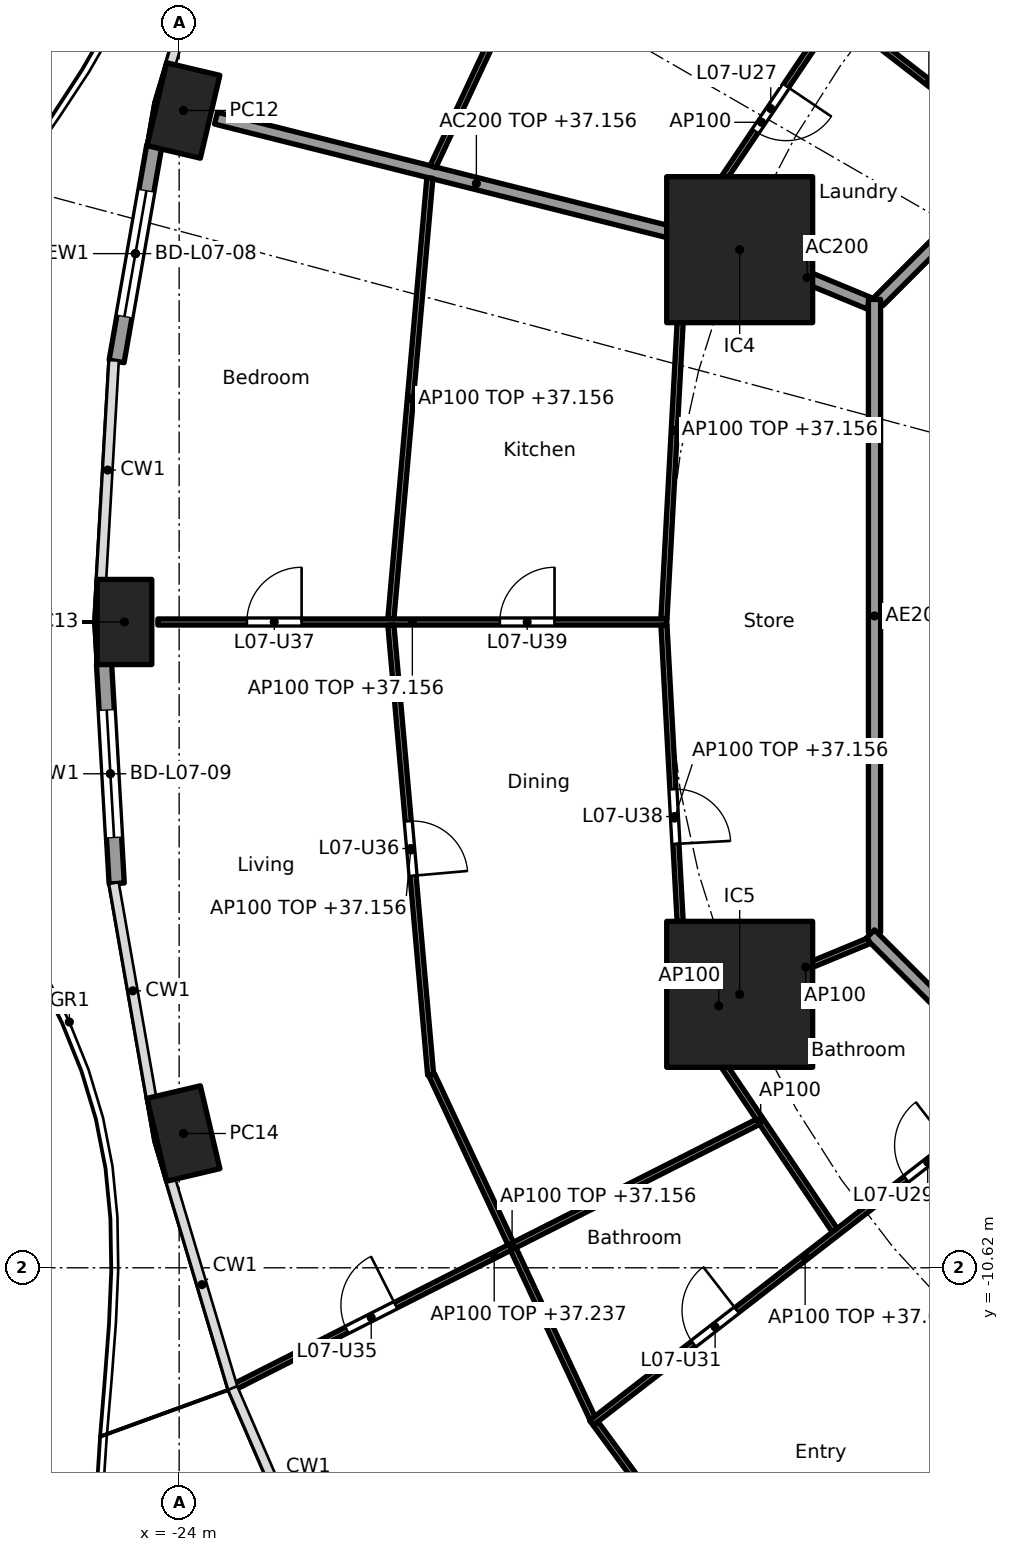
"""IFC4 building model, lengths in metres.
Left out: names, types, materials, properties, quantities, classifications, styles, units other than length and angle.
Written with IfcOpenShell. Run it as: python <this file> out.ifc"""

import sys

from ifc_helpers import new_model, si_unit, direction, frame, frame_2d, origin, origin_2d, place, context, subcontext, project, spatial, rectangle, hollow_rectangle, extrude, element, fill, save


model = new_model("IFC4")
c1 = context("Model", 3, precision=1e-05, world=origin(), true_north=direction((0.0, 1.0)))
c2 = subcontext(c1, "Body", "Model", "MODEL_VIEW")
j1 = project(units=[si_unit("LENGTHUNIT", "METRE"), si_unit("PLANEANGLEUNIT", "RADIAN")], contexts=[c1])
p1 = place(None, origin())
s1 = spatial("IfcSite", under=j1, at=p1, CompositionType="ELEMENT")
p2 = place(p1, origin())
s2 = spatial("IfcBuilding", under=s1, at=p2, CompositionType="ELEMENT")
p3 = place(p2, frame((0.0, 0.0, 34.4)))
s3 = spatial("IfcBuildingStorey", under=s2, at=p3, CompositionType="ELEMENT", Elevation=34.4)
for number, where, z_axis, x_axis in (
    (1, (-23.929, 8.412, 0.0), (0.0, 0.0, 1.0), (-0.229, -0.973, 0.0)),
    (2, (-24.9, 0.0, 0.0), (0.0, 0.0, 1.0), (0.0, -1.0, 0.0)),
    (3, (-23.929, -8.412, 0.0), (0.0, 0.0, 1.0), (0.229, -0.973, 0.0)),
):
    element("IfcColumn", number, at=place(p3, frame(where, z_axis=z_axis, x_axis=x_axis)), inside=s3, PredefinedType="COLUMN", context=c2, shape_type="SweptSolid", body=[
        extrude(hollow_rectangle(XDim=1.4, YDim=0.9, WallThickness=0.05, at=origin_2d()), origin(), (0.0, 0.0, 1.0), 3.7),
    ])
for number, where, z_axis, x_axis in (
    (4, (-14.782, 6.123, 0.0), (0.0, 0.0, 1.0), (1.0, 0.0, 0.0)),
    (5, (-14.782, -6.123, 0.0), (0.0, 0.0, 1.0), (1.0, 0.0, 0.0)),
):
    element("IfcColumn", number, at=place(p3, frame(where, z_axis=z_axis, x_axis=x_axis)), inside=s3, PredefinedType="COLUMN", context=c2, shape_type="SweptSolid", body=[
        extrude(rectangle(XDim=2.4, YDim=2.4, at=origin_2d()), origin(), (0.0, 0.0, 1.0), 3.7),
    ])
p4 = place(p3, frame((-25.029, 4.286, 0.0), z_axis=(0.0, 0.0, 1.0), x_axis=(0.172217377323, 0.98505897029, 0.0)))
e6 = element("IfcWall", 6, at=p4, inside=s3, PredefinedType="SOLIDWALL", context=c2, shape_type="SweptSolid", body=[
    extrude(rectangle(XDim=3.598, YDim=0.25, at=frame_2d((1.799, 0.0))), origin(), (0.0, 0.0, 1.0), 3.44),
])
p5 = place(p4, frame((0.749, 0.0, 0.0)))
e7 = element("IfcOpeningElement", 7, at=p5, cuts=e6, PredefinedType="OPENING", context=c2, shape_type="SweptSolid", body=[
    extrude(rectangle(XDim=2.1, YDim=2.4, at=frame_2d((1.05, 1.2))), frame((0.0, 0.135, 0.0), z_axis=(0.0, -1.0, 0.0), x_axis=(1.0, 0.0, 0.0)), (0.0, 0.0, 1.0), 0.27),
])
p6 = place(p3, frame((-25.027, -4.3, 0.0), z_axis=(0.0, 0.0, 1.0), x_axis=(-0.057478727308, 0.998346731305, 0.0)))
e8 = element("IfcWall", 8, at=p6, inside=s3, PredefinedType="SOLIDWALL", context=c2, shape_type="SweptSolid", body=[
    extrude(rectangle(XDim=3.615, YDim=0.25, at=frame_2d((1.807, 0.0))), origin(), (0.0, 0.0, 1.0), 3.44),
])
p7 = place(p6, frame((0.757, 0.0, 0.0)))
e9 = element("IfcOpeningElement", 9, at=p7, cuts=e8, PredefinedType="OPENING", context=c2, shape_type="SweptSolid", body=[
    extrude(rectangle(XDim=2.1, YDim=2.4, at=frame_2d((1.05, 1.2))), frame((0.0, 0.135, 0.0), z_axis=(0.0, -1.0, 0.0), x_axis=(1.0, 0.0, 0.0)), (0.0, 0.0, 1.0), 0.27),
])
p8 = place(p3, frame((-12.657, 5.243, 0.0), z_axis=(0.0, 0.0, 1.0), x_axis=(-0.923885664896, 0.382668627144, 0.0)))
e10 = element("IfcWall", 10, at=p8, inside=s3, PredefinedType="PARTITIONING", context=c2, shape_type="SweptSolid", body=[
    extrude(rectangle(XDim=2.2, YDim=0.2, at=frame_2d((1.1, 0.0))), origin(), (0.0, 0.0, 1.0), 3.44),
])
p9 = place(p3, frame((-14.831, 6.135, 0.0), z_axis=(0.0, 0.0, 1.0), x_axis=(-0.969884949569, 0.243563512454, 0.0)))
e11 = element("IfcWall", 11, at=p9, inside=s3, PredefinedType="PARTITIONING", context=c2, shape_type="SweptSolid", body=[
    extrude(rectangle(XDim=8.829, YDim=0.2, at=frame_2d((4.415, 0.0))), origin(), (0.0, 0.0, 1.0), 2.756),
])
p10 = place(p3, frame((-5.275, 12.494, 0.0), z_axis=(0.0, 0.0, 1.0), x_axis=(-0.707106781187, -0.707106781187, 0.0)))
e12 = element("IfcWall", 12, at=p10, inside=s3, PredefinedType="PARTITIONING", context=c2, shape_type="SweptSolid", body=[
    extrude(rectangle(XDim=10.209, YDim=0.2, at=frame_2d((5.104, 0.0))), origin(), (0.0, 0.0, 1.0), 3.44),
])
p11 = place(p3, frame((-12.565, 5.304, 0.0), z_axis=(0.0, 0.0, 1.0), x_axis=(0.0, -1.0, 0.0)))
e13 = element("IfcWall", 13, at=p11, inside=s3, PredefinedType="PARTITIONING", context=c2, shape_type="SweptSolid", body=[
    extrude(rectangle(XDim=10.409, YDim=0.2, at=frame_2d((5.205, 0.0))), origin(), (0.0, 0.0, 1.0), 3.44),
])
p12 = place(p3, frame((-12.635, -5.134, 0.0), z_axis=(0.0, 0.0, 1.0), x_axis=(0.707106781187, -0.707106781187, 0.0)))
e14 = element("IfcWall", 14, at=p12, inside=s3, PredefinedType="PARTITIONING", context=c2, shape_type="SweptSolid", body=[
    extrude(rectangle(XDim=10.609, YDim=0.2, at=frame_2d((5.305, 0.0))), origin(), (0.0, 0.0, 1.0), 3.44),
])
p13 = place(p12, frame((4.804, 0.0, 0.0)))
e15 = element("IfcOpeningElement", 15, at=p13, cuts=e14, PredefinedType="OPENING", context=c2, shape_type="SweptSolid", body=[
    extrude(rectangle(XDim=1.0, YDim=2.1, at=frame_2d((0.5, 1.05))), frame((0.0, 0.11, 0.0), z_axis=(0.0, -1.0, 0.0), x_axis=(1.0, 0.0, 0.0)), (0.0, 0.0, 1.0), 0.22),
])
p14 = place(p3, frame((-10.19, 7.719, 0.0), z_axis=(0.0, 0.0, 1.0), x_axis=(-0.790253294643, 0.612780327937, 0.0)))
e16 = element("IfcWall", 16, at=p14, inside=s3, PredefinedType="PARTITIONING", context=c2, shape_type="SweptSolid", body=[
    extrude(rectangle(XDim=3.746, YDim=0.1, at=frame_2d((1.873, 0.0))), origin(), (0.0, 0.0, 1.0), 2.687),
])
p15 = place(p3, frame((-13.218, 10.004, 0.0), z_axis=(0.0, 0.0, 1.0), x_axis=(-0.559112679527, -0.829091678641, 0.0)))
e17 = element("IfcWall", 17, at=p15, inside=s3, PredefinedType="PARTITIONING", context=c2, shape_type="SweptSolid", body=[
    extrude(rectangle(XDim=4.308, YDim=0.1, at=frame_2d((2.154, 0.0))), origin(), (0.0, 0.0, 1.0), 3.44),
])
p16 = place(p15, frame((1.433, 0.0, 0.0)))
e18 = element("IfcOpeningElement", 18, at=p16, cuts=e17, PredefinedType="OPENING", context=c2, shape_type="SweptSolid", body=[
    extrude(rectangle(XDim=0.9, YDim=2.1, at=frame_2d((0.45, 1.05))), frame((0.0, 0.06, 0.0), z_axis=(0.0, -1.0, 0.0), x_axis=(1.0, 0.0, 0.0)), (0.0, 0.0, 1.0), 0.12),
])
p17 = place(p3, frame((-17.203, 13.095, 0.0), z_axis=(0.0, 0.0, 1.0), x_axis=(-0.423926333401, -0.905696673202, 0.0)))
e19 = element("IfcWall", 19, at=p17, inside=s3, PredefinedType="PARTITIONING", context=c2, shape_type="SweptSolid", body=[
    extrude(rectangle(XDim=6.188, YDim=0.1, at=frame_2d((3.094, 0.0))), origin(), (0.0, 0.0, 1.0), 2.756),
])
p18 = place(p3, frame((-15.688, 6.249, 0.0), z_axis=(0.0, 0.0, 1.0), x_axis=(-0.054659814056, -0.998505034903, 0.0)))
e20 = element("IfcWall", 20, at=p18, inside=s3, PredefinedType="PARTITIONING", context=c2, shape_type="SweptSolid", body=[
    extrude(rectangle(XDim=6.208, YDim=0.1, at=frame_2d((3.104, 0.0))), origin(), (0.0, 0.0, 1.0), 2.756),
])
p19 = place(p3, frame((-19.877, 7.301, 0.0), z_axis=(0.0, 0.0, 1.0), x_axis=(-0.088143415068, -0.996107794558, 0.0)))
e21 = element("IfcWall", 21, at=p19, inside=s3, PredefinedType="PARTITIONING", context=c2, shape_type="SweptSolid", body=[
    extrude(rectangle(XDim=7.279, YDim=0.1, at=frame_2d((3.64, 0.0))), origin(), (0.0, 0.0, 1.0), 2.756),
])
p20 = place(p3, frame((-15.98, 0.0, 0.0), z_axis=(0.0, 0.0, 1.0), x_axis=(-1.0, 0.0, 0.0)))
e22 = element("IfcWall", 22, at=p20, inside=s3, PredefinedType="PARTITIONING", context=c2, shape_type="SweptSolid", body=[
    extrude(rectangle(XDim=8.37, YDim=0.1, at=frame_2d((4.185, 0.0))), origin(), (0.0, 0.0, 1.0), 2.756),
])
p21 = place(p20, frame((6.006, 0.0, 0.0)))
e23 = element("IfcOpeningElement", 23, at=p21, cuts=e22, PredefinedType="OPENING", context=c2, shape_type="SweptSolid", body=[
    extrude(rectangle(XDim=0.9, YDim=2.1, at=frame_2d((0.45, 1.05))), frame((0.0, 0.06, 0.0), z_axis=(0.0, -1.0, 0.0), x_axis=(1.0, 0.0, 0.0)), (0.0, 0.0, 1.0), 0.12),
])
p22 = place(p20, frame((1.846, 0.0, 0.0)))
e24 = element("IfcOpeningElement", 24, at=p22, cuts=e22, PredefinedType="OPENING", context=c2, shape_type="SweptSolid", body=[
    extrude(rectangle(XDim=0.9, YDim=2.1, at=frame_2d((0.45, 1.05))), frame((0.0, 0.06, 0.0), z_axis=(0.0, -1.0, 0.0), x_axis=(1.0, 0.0, 0.0)), (0.0, 0.0, 1.0), 0.12),
])
p23 = place(p3, frame((-16.028, -0.05, 0.0), z_axis=(0.0, 0.0, 1.0), x_axis=(0.054636410342, -0.998506315786, 0.0)))
e25 = element("IfcWall", 25, at=p23, inside=s3, PredefinedType="PARTITIONING", context=c2, shape_type="SweptSolid", body=[
    extrude(rectangle(XDim=6.359, YDim=0.1, at=frame_2d((3.179, 0.0))), origin(), (0.0, 0.0, 1.0), 2.756),
])
p24 = place(p23, frame((2.704, 0.0, 0.0)))
e26 = element("IfcOpeningElement", 26, at=p24, cuts=e25, PredefinedType="OPENING", context=c2, shape_type="SweptSolid", body=[
    extrude(rectangle(XDim=0.9, YDim=2.1, at=frame_2d((0.45, 1.05))), frame((0.0, 0.06, 0.0), z_axis=(0.0, -1.0, 0.0), x_axis=(1.0, 0.0, 0.0)), (0.0, 0.0, 1.0), 0.12),
])
p25 = place(p3, frame((-20.518, -0.05, 0.0), z_axis=(0.0, 0.0, 1.0), x_axis=(0.088138375539, -0.996108240483, 0.0)))
e27 = element("IfcWall", 27, at=p25, inside=s3, PredefinedType="PARTITIONING", context=c2, shape_type="SweptSolid", body=[
    extrude(rectangle(XDim=7.429, YDim=0.1, at=frame_2d((3.714, 0.0))), origin(), (0.0, 0.0, 1.0), 2.756),
])
p26 = place(p25, frame((3.24, 0.0, 0.0)))
e28 = element("IfcOpeningElement", 28, at=p26, cuts=e27, PredefinedType="OPENING", context=c2, shape_type="SweptSolid", body=[
    extrude(rectangle(XDim=0.9, YDim=2.1, at=frame_2d((0.45, 1.05))), frame((0.0, 0.06, 0.0), z_axis=(0.0, -1.0, 0.0), x_axis=(1.0, 0.0, 0.0)), (0.0, 0.0, 1.0), 0.12),
])
p27 = place(p3, frame((-12.657, -5.243, 0.0), z_axis=(0.0, 0.0, 1.0), x_axis=(-0.923864733477, -0.382719158442, 0.0)))
e29 = element("IfcWall", 29, at=p27, inside=s3, PredefinedType="PARTITIONING", context=c2, shape_type="SweptSolid", body=[
    extrude(rectangle(XDim=2.25, YDim=0.1, at=frame_2d((1.125, 0.0))), origin(), (0.0, 0.0, 1.0), 3.44),
])
p28 = place(p3, frame((-15.655, -6.391, 0.0), z_axis=(0.0, 0.0, 1.0), x_axis=(0.559126445155, -0.82908239538, 0.0)))
e30 = element("IfcWall", 30, at=p28, inside=s3, PredefinedType="PARTITIONING", context=c2, shape_type="SweptSolid", body=[
    extrude(rectangle(XDim=4.358, YDim=0.1, at=frame_2d((2.179, 0.0))), origin(), (0.0, 0.0, 1.0), 3.44),
])
p29 = place(p3, frame((-19.847, -7.445, 0.0), z_axis=(0.0, 0.0, 1.0), x_axis=(0.423892287987, -0.905712607942, 0.0)))
e31 = element("IfcWall", 31, at=p29, inside=s3, PredefinedType="PARTITIONING", context=c2, shape_type="SweptSolid", body=[
    extrude(rectangle(XDim=6.238, YDim=0.1, at=frame_2d((3.119, 0.0))), origin(), (0.0, 0.0, 1.0), 2.756),
])
p30 = place(p3, frame((-14.481, -8.22, 0.0), z_axis=(0.0, 0.0, 1.0), x_axis=(-0.892232077638, -0.451577146935, 0.0)))
e32 = element("IfcWall", 32, at=p30, inside=s3, PredefinedType="PARTITIONING", context=c2, shape_type="SweptSolid", body=[
    extrude(rectangle(XDim=9.723, YDim=0.1, at=frame_2d((4.862, 0.0))), origin(), (0.0, 0.0, 1.0), 2.837),
])
p31 = place(p30, frame((6.678, 0.0, 0.0)))
e33 = element("IfcOpeningElement", 33, at=p31, cuts=e32, PredefinedType="OPENING", context=c2, shape_type="SweptSolid", body=[
    extrude(rectangle(XDim=0.9, YDim=2.1, at=frame_2d((0.45, 1.05))), frame((0.0, 0.06, 0.0), z_axis=(0.0, -1.0, 0.0), x_axis=(1.0, 0.0, 0.0)), (0.0, 0.0, 1.0), 0.12),
])
p32 = place(p3, frame((-10.19, -7.719, 0.0), z_axis=(0.0, 0.0, 1.0), x_axis=(-0.790264549439, -0.612765813259, 0.0)))
e34 = element("IfcWall", 34, at=p32, inside=s3, PredefinedType="PARTITIONING", context=c2, shape_type="SweptSolid", body=[
    extrude(rectangle(XDim=8.896, YDim=0.1, at=frame_2d((4.448, 0.0))), origin(), (0.0, 0.0, 1.0), 2.687),
])
p33 = place(p32, frame((1.448, 0.0, 0.0)))
e35 = element("IfcOpeningElement", 35, at=p33, cuts=e34, PredefinedType="OPENING", context=c2, shape_type="SweptSolid", body=[
    extrude(rectangle(XDim=0.9, YDim=2.1, at=frame_2d((0.45, 1.05))), frame((0.0, 0.06, 0.0), z_axis=(0.0, -1.0, 0.0), x_axis=(1.0, 0.0, 0.0)), (0.0, 0.0, 1.0), 0.12),
])
p34 = place(p32, frame((5.871, 0.0, 0.0)))
e36 = element("IfcOpeningElement", 36, at=p34, cuts=e34, PredefinedType="OPENING", context=c2, shape_type="SweptSolid", body=[
    extrude(rectangle(XDim=0.9, YDim=2.1, at=frame_2d((0.45, 1.05))), frame((0.0, 0.06, 0.0), z_axis=(0.0, -1.0, 0.0), x_axis=(1.0, 0.0, 0.0)), (0.0, 0.0, 1.0), 0.12),
])
p35 = place(p3, frame((-17.152, -13.18, 0.0), z_axis=(0.0, 0.0, 1.0), x_axis=(0.591222750954, -0.806508312886, 0.0)))
e37 = element("IfcWall", 37, at=p35, inside=s3, PredefinedType="PARTITIONING", context=c2, shape_type="SweptSolid", body=[
    extrude(rectangle(XDim=6.31, YDim=0.1, at=frame_2d((3.155, 0.0))), origin(), (0.0, 0.0, 1.0), 2.756),
])
p36 = place(p35, frame((2.705, 0.0, 0.0)))
e38 = element("IfcOpeningElement", 38, at=p36, cuts=e37, PredefinedType="OPENING", context=c2, shape_type="SweptSolid", body=[
    extrude(rectangle(XDim=0.9, YDim=2.1, at=frame_2d((0.45, 1.05))), frame((0.0, 0.06, 0.0), z_axis=(0.0, -1.0, 0.0), x_axis=(1.0, 0.0, 0.0)), (0.0, 0.0, 1.0), 0.12),
])
p37 = place(p3, frame((-7.715, -10.193, 0.0), z_axis=(0.0, 0.0, 1.0), x_axis=(-0.573126964124, -0.819466584428, 0.0)))
e39 = element("IfcWall", 39, at=p37, inside=s3, PredefinedType="PARTITIONING", context=c2, shape_type="SweptSolid", body=[
    extrude(rectangle(XDim=15.001, YDim=0.1, at=frame_2d((7.5, 0.0))), origin(), (0.0, 0.0, 1.0), 2.687),
])
p38 = place(p37, frame((1.678, 0.0, 0.0)))
e40 = element("IfcOpeningElement", 40, at=p38, cuts=e39, PredefinedType="OPENING", context=c2, shape_type="SweptSolid", body=[
    extrude(rectangle(XDim=0.9, YDim=2.1, at=frame_2d((0.45, 1.05))), frame((0.0, 0.06, 0.0), z_axis=(0.0, -1.0, 0.0), x_axis=(1.0, 0.0, 0.0)), (0.0, 0.0, 1.0), 0.12),
])
p39 = place(p37, frame((6.631, 0.0, 0.0)))
e41 = element("IfcOpeningElement", 41, at=p39, cuts=e39, PredefinedType="OPENING", context=c2, shape_type="SweptSolid", body=[
    extrude(rectangle(XDim=0.9, YDim=2.1, at=frame_2d((0.45, 1.05))), frame((0.0, 0.06, 0.0), z_axis=(0.0, -1.0, 0.0), x_axis=(1.0, 0.0, 0.0)), (0.0, 0.0, 1.0), 0.12),
])
p40 = place(p3, frame((-15.469, -6.398, 0.0), z_axis=(0.0, 0.0, 1.0), x_axis=(0.969858002632, 0.243670791706, 0.0)))
e42 = element("IfcWall", 42, at=p40, inside=s3, PredefinedType="PARTITIONING", context=c2, shape_type="SweptSolid", body=[
    extrude(rectangle(XDim=0.708, YDim=0.1, at=frame_2d((0.354, 0.0))), origin(), (0.0, 0.0, 1.0), 3.44),
])
p41 = place(p5, origin())
e43 = element("IfcDoor", 43, at=p41, inside=s3, OperationType="SLIDING_TO_LEFT", PredefinedType="DOOR", context=c2, shape_type="SweptSolid", body=[
    extrude(rectangle(XDim=2.1, YDim=2.4, at=frame_2d((1.05, 1.2))), frame((0.0, 0.025, 0.0), z_axis=(0.0, -1.0, 0.0), x_axis=(1.0, 0.0, 0.0)), (0.0, 0.0, 1.0), 0.05),
])
fill(e7, e43)
p42 = place(p7, origin())
e44 = element("IfcDoor", 44, at=p42, inside=s3, OperationType="SLIDING_TO_LEFT", PredefinedType="DOOR", context=c2, shape_type="SweptSolid", body=[
    extrude(rectangle(XDim=2.1, YDim=2.4, at=frame_2d((1.05, 1.2))), frame((0.0, 0.025, 0.0), z_axis=(0.0, -1.0, 0.0), x_axis=(1.0, 0.0, 0.0)), (0.0, 0.0, 1.0), 0.05),
])
fill(e9, e44)
p43 = place(p16, origin())
e45 = element("IfcDoor", 45, at=p43, inside=s3, OperationType="SINGLE_SWING_LEFT", PredefinedType="DOOR", context=c2, shape_type="SweptSolid", body=[
    extrude(rectangle(XDim=0.9, YDim=2.1, at=frame_2d((0.45, 1.05))), frame((0.0, 0.025, 0.0), z_axis=(0.0, -1.0, 0.0), x_axis=(1.0, 0.0, 0.0)), (0.0, 0.0, 1.0), 0.05),
])
fill(e18, e45)
p44 = place(p33, frame((0.9, 0.0, 0.0), x_axis=(-1.0, 0.0, 0.0)))
e46 = element("IfcDoor", 46, at=p44, inside=s3, OperationType="SINGLE_SWING_RIGHT", PredefinedType="DOOR", context=c2, shape_type="SweptSolid", body=[
    extrude(rectangle(XDim=0.9, YDim=2.1, at=frame_2d((0.45, 1.05))), frame((0.0, 0.025, 0.0), z_axis=(0.0, -1.0, 0.0), x_axis=(1.0, 0.0, 0.0)), (0.0, 0.0, 1.0), 0.05),
])
fill(e35, e46)
p45 = place(p34, frame((0.9, 0.0, 0.0), x_axis=(-1.0, 0.0, 0.0)))
e47 = element("IfcDoor", 47, at=p45, inside=s3, OperationType="SINGLE_SWING_RIGHT", PredefinedType="DOOR", context=c2, shape_type="SweptSolid", body=[
    extrude(rectangle(XDim=0.9, YDim=2.1, at=frame_2d((0.45, 1.05))), frame((0.0, 0.025, 0.0), z_axis=(0.0, -1.0, 0.0), x_axis=(1.0, 0.0, 0.0)), (0.0, 0.0, 1.0), 0.05),
])
fill(e36, e47)
p46 = place(p31, frame((0.9, 0.0, 0.0), x_axis=(-1.0, 0.0, 0.0)))
e48 = element("IfcDoor", 48, at=p46, inside=s3, OperationType="SINGLE_SWING_RIGHT", PredefinedType="DOOR", context=c2, shape_type="SweptSolid", body=[
    extrude(rectangle(XDim=0.9, YDim=2.1, at=frame_2d((0.45, 1.05))), frame((0.0, 0.025, 0.0), z_axis=(0.0, -1.0, 0.0), x_axis=(1.0, 0.0, 0.0)), (0.0, 0.0, 1.0), 0.05),
])
fill(e33, e48)
p47 = place(p26, origin())
e49 = element("IfcDoor", 49, at=p47, inside=s3, OperationType="SINGLE_SWING_RIGHT", PredefinedType="DOOR", context=c2, shape_type="SweptSolid", body=[
    extrude(rectangle(XDim=0.9, YDim=2.1, at=frame_2d((0.45, 1.05))), frame((0.0, 0.025, 0.0), z_axis=(0.0, -1.0, 0.0), x_axis=(1.0, 0.0, 0.0)), (0.0, 0.0, 1.0), 0.05),
])
fill(e28, e49)
p48 = place(p21, frame((0.9, 0.0, 0.0), x_axis=(-1.0, 0.0, 0.0)))
e50 = element("IfcDoor", 50, at=p48, inside=s3, OperationType="SINGLE_SWING_RIGHT", PredefinedType="DOOR", context=c2, shape_type="SweptSolid", body=[
    extrude(rectangle(XDim=0.9, YDim=2.1, at=frame_2d((0.45, 1.05))), frame((0.0, 0.025, 0.0), z_axis=(0.0, -1.0, 0.0), x_axis=(1.0, 0.0, 0.0)), (0.0, 0.0, 1.0), 0.05),
])
fill(e23, e50)
p49 = place(p24, origin())
e51 = element("IfcDoor", 51, at=p49, inside=s3, OperationType="SINGLE_SWING_RIGHT", PredefinedType="DOOR", context=c2, shape_type="SweptSolid", body=[
    extrude(rectangle(XDim=0.9, YDim=2.1, at=frame_2d((0.45, 1.05))), frame((0.0, 0.025, 0.0), z_axis=(0.0, -1.0, 0.0), x_axis=(1.0, 0.0, 0.0)), (0.0, 0.0, 1.0), 0.05),
])
fill(e26, e51)
p50 = place(p22, frame((0.9, 0.0, 0.0), x_axis=(-1.0, 0.0, 0.0)))
e52 = element("IfcDoor", 52, at=p50, inside=s3, OperationType="SINGLE_SWING_RIGHT", PredefinedType="DOOR", context=c2, shape_type="SweptSolid", body=[
    extrude(rectangle(XDim=0.9, YDim=2.1, at=frame_2d((0.45, 1.05))), frame((0.0, 0.025, 0.0), z_axis=(0.0, -1.0, 0.0), x_axis=(1.0, 0.0, 0.0)), (0.0, 0.0, 1.0), 0.05),
])
fill(e24, e52)
save(model, sys.argv[1])
